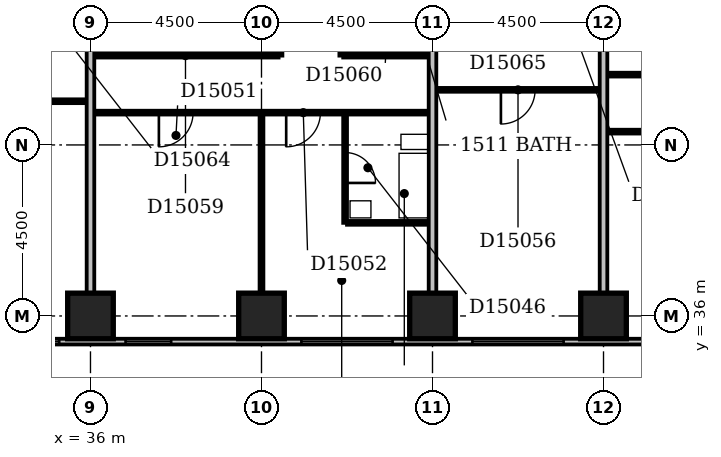
"""IFC4 building model, lengths in metres.
Left out: names, types, materials, properties, quantities, classifications, styles, units other than length and angle.
Written with IfcOpenShell. Run it as: python <this file> out.ifc"""

import sys

from ifc_helpers import new_model, si_unit, direction, frame, frame_2d, origin, origin_2d, place, context, subcontext, project, spatial, rectangle, extrude, element, fill, save


model = new_model("IFC4")
c1 = context("Model", 3, precision=1e-05, world=origin(), true_north=direction((0.0, 1.0)))
c2 = subcontext(c1, "Body", "Model", "MODEL_VIEW")
j1 = project(units=[si_unit("LENGTHUNIT", "METRE"), si_unit("PLANEANGLEUNIT", "RADIAN")], contexts=[c1])
p1 = place(None, origin())
s1 = spatial("IfcSite", under=j1, at=p1, CompositionType="ELEMENT")
p2 = place(p1, origin())
s2 = spatial("IfcBuilding", under=s1, at=p2, CompositionType="ELEMENT")
p3 = place(p2, frame((0.0, 0.0, 65.0)))
s3 = spatial("IfcBuildingStorey", under=s2, at=p3, CompositionType="ELEMENT", Elevation=65.0)
for number, where, z_axis, x_axis in (
    (1, (36.0, 36.0, -0.3), (0.0, 0.0, 1.0), (1.0, 0.0, 0.0)),
    (2, (40.5, 36.0, -0.3), (0.0, 0.0, 1.0), (1.0, 0.0, 0.0)),
    (3, (45.0, 36.0, -0.3), (0.0, 0.0, 1.0), (1.0, 0.0, 0.0)),
    (4, (49.5, 36.0, -0.3), (0.0, 0.0, 1.0), (1.0, 0.0, 0.0)),
):
    element("IfcColumn", number, at=place(p3, frame(where, z_axis=z_axis, x_axis=x_axis)), inside=s3, PredefinedType="COLUMN", context=c2, shape_type="SweptSolid", body=[
        extrude(rectangle(XDim=1.2, YDim=1.2, at=origin_2d()), origin(), (0.0, 0.0, 1.0), 3.6),
    ])
p4 = place(p3, frame((23.1, 35.325, 0.0), z_axis=(0.0, 0.0, 1.0), x_axis=(1.0, 0.0, 0.0)))
e5 = element("IfcWall", 5, at=p4, inside=s3, PredefinedType="STANDARD", context=c2, shape_type="SweptSolid", body=[
    extrude(rectangle(XDim=45.15, YDim=0.15, at=frame_2d((22.575, 0.0))), origin(), (0.0, 0.0, 1.0), 2.7),
])
p5 = place(p4, frame((0.45, 0.0, 0.6)))
e6 = element("IfcOpeningElement", 6, at=p5, cuts=e5, PredefinedType="OPENING", context=c2, shape_type="SweptSolid", body=[
    extrude(rectangle(XDim=2.4, YDim=1.8, at=frame_2d((1.2, 0.9))), frame((0.0, 0.087, 0.0), z_axis=(0.0, -1.0, 0.0), x_axis=(1.0, 0.0, 0.0)), (0.0, 0.0, 1.0), 0.174),
])
p6 = place(p4, frame((4.95, 0.0, 0.6)))
e7 = element("IfcOpeningElement", 7, at=p6, cuts=e5, PredefinedType="OPENING", context=c2, shape_type="SweptSolid", body=[
    extrude(rectangle(XDim=2.4, YDim=1.8, at=frame_2d((1.2, 0.9))), frame((0.0, 0.087, 0.0), z_axis=(0.0, -1.0, 0.0), x_axis=(1.0, 0.0, 0.0)), (0.0, 0.0, 1.0), 0.174),
])
p7 = place(p4, frame((10.877, 0.0, 0.6)))
e8 = element("IfcOpeningElement", 8, at=p7, cuts=e5, PredefinedType="OPENING", context=c2, shape_type="SweptSolid", body=[
    extrude(rectangle(XDim=1.2, YDim=1.8, at=frame_2d((0.6, 0.9))), frame((0.0, 0.087, 0.0), z_axis=(0.0, -1.0, 0.0), x_axis=(1.0, 0.0, 0.0)), (0.0, 0.0, 1.0), 0.174),
])
p8 = place(p4, frame((13.823, 0.0, 0.6)))
e9 = element("IfcOpeningElement", 9, at=p8, cuts=e5, PredefinedType="OPENING", context=c2, shape_type="SweptSolid", body=[
    extrude(rectangle(XDim=1.2, YDim=1.8, at=frame_2d((0.6, 0.9))), frame((0.0, 0.087, 0.0), z_axis=(0.0, -1.0, 0.0), x_axis=(1.0, 0.0, 0.0)), (0.0, 0.0, 1.0), 0.174),
])
p9 = place(p4, frame((18.45, 0.0, 0.6)))
e10 = element("IfcOpeningElement", 10, at=p9, cuts=e5, PredefinedType="OPENING", context=c2, shape_type="SweptSolid", body=[
    extrude(rectangle(XDim=2.4, YDim=1.8, at=frame_2d((1.2, 0.9))), frame((0.0, 0.087, 0.0), z_axis=(0.0, -1.0, 0.0), x_axis=(1.0, 0.0, 0.0)), (0.0, 0.0, 1.0), 0.174),
])
p10 = place(p4, frame((22.95, 0.0, 0.6)))
e11 = element("IfcOpeningElement", 11, at=p10, cuts=e5, PredefinedType="OPENING", context=c2, shape_type="SweptSolid", body=[
    extrude(rectangle(XDim=2.4, YDim=1.8, at=frame_2d((1.2, 0.9))), frame((0.0, 0.087, 0.0), z_axis=(0.0, -1.0, 0.0), x_axis=(1.0, 0.0, 0.0)), (0.0, 0.0, 1.0), 0.174),
])
p11 = place(p4, frame((27.45, 0.0, 0.6)))
e12 = element("IfcOpeningElement", 12, at=p11, cuts=e5, PredefinedType="OPENING", context=c2, shape_type="SweptSolid", body=[
    extrude(rectangle(XDim=2.4, YDim=1.8, at=frame_2d((1.2, 0.9))), frame((0.0, 0.087, 0.0), z_axis=(0.0, -1.0, 0.0), x_axis=(1.0, 0.0, 0.0)), (0.0, 0.0, 1.0), 0.174),
])
p12 = place(p4, frame((31.95, 0.0, 0.6)))
e13 = element("IfcOpeningElement", 13, at=p12, cuts=e5, PredefinedType="OPENING", context=c2, shape_type="SweptSolid", body=[
    extrude(rectangle(XDim=2.4, YDim=1.8, at=frame_2d((1.2, 0.9))), frame((0.0, 0.087, 0.0), z_axis=(0.0, -1.0, 0.0), x_axis=(1.0, 0.0, 0.0)), (0.0, 0.0, 1.0), 0.174),
])
p13 = place(p4, frame((36.45, 0.0, 0.6)))
e14 = element("IfcOpeningElement", 14, at=p13, cuts=e5, PredefinedType="OPENING", context=c2, shape_type="SweptSolid", body=[
    extrude(rectangle(XDim=2.4, YDim=1.8, at=frame_2d((1.2, 0.9))), frame((0.0, 0.087, 0.0), z_axis=(0.0, -1.0, 0.0), x_axis=(1.0, 0.0, 0.0)), (0.0, 0.0, 1.0), 0.174),
])
p14 = place(p4, frame((41.403, 0.0, 0.6)))
e15 = element("IfcOpeningElement", 15, at=p14, cuts=e5, PredefinedType="OPENING", context=c2, shape_type="SweptSolid", body=[
    extrude(rectangle(XDim=2.1, YDim=1.8, at=frame_2d((1.05, 0.9))), frame((0.0, 0.087, 0.0), z_axis=(0.0, -1.0, 0.0), x_axis=(1.0, 0.0, 0.0)), (0.0, 0.0, 1.0), 0.174),
])
p15 = place(p3, frame((36.0, 36.6, 0.0), z_axis=(0.0, 0.0, 1.0), x_axis=(0.0, 1.0, 0.0)))
e16 = element("IfcWall", 16, at=p15, inside=s3, PredefinedType="PARTITIONING", context=c2, shape_type="SweptSolid", body=[
    extrude(rectangle(XDim=12.8, YDim=0.2, at=frame_2d((6.4, 0.0))), origin(), (0.0, 0.0, 1.0), 2.4),
])
p16 = place(p3, frame((40.5, 36.6, 0.0), z_axis=(0.0, 0.0, 1.0), x_axis=(0.0, 1.0, 0.0)))
e17 = element("IfcWall", 17, at=p16, inside=s3, PredefinedType="PARTITIONING", context=c2, shape_type="SweptSolid", body=[
    extrude(rectangle(XDim=4.7, YDim=0.1, at=frame_2d((2.35, 0.0))), origin(), (0.0, 0.0, 1.0), 3.3),
])
p17 = place(p3, frame((45.0, 36.6, 0.0), z_axis=(0.0, 0.0, 1.0), x_axis=(0.0, 1.0, 0.0)))
e18 = element("IfcWall", 18, at=p17, inside=s3, PredefinedType="PARTITIONING", context=c2, shape_type="SweptSolid", body=[
    extrude(rectangle(XDim=12.8, YDim=0.2, at=frame_2d((6.4, 0.0))), origin(), (0.0, 0.0, 1.0), 2.6),
])
p18 = place(p3, frame((49.5, 36.6, 0.0), z_axis=(0.0, 0.0, 1.0), x_axis=(0.0, 1.0, 0.0)))
e19 = element("IfcWall", 19, at=p18, inside=s3, PredefinedType="PARTITIONING", context=c2, shape_type="SweptSolid", body=[
    extrude(rectangle(XDim=12.8, YDim=0.2, at=frame_2d((6.4, 0.0))), origin(), (0.0, 0.0, 1.0), 3.3),
])
p19 = place(p3, frame((42.7, 38.45, 0.0), z_axis=(0.0, 0.0, 1.0), x_axis=(0.0, 1.0, 0.0)))
e20 = element("IfcWall", 20, at=p19, inside=s3, PredefinedType="PLUMBINGWALL", context=c2, shape_type="SweptSolid", body=[
    extrude(rectangle(XDim=2.85, YDim=0.1, at=frame_2d((1.425, 0.0))), origin(), (0.0, 0.0, 1.0), 3.3),
])
p20 = place(p19, frame((1.05, 0.0, 0.0)))
e21 = element("IfcOpeningElement", 21, at=p20, cuts=e20, PredefinedType="OPENING", context=c2, shape_type="SweptSolid", body=[
    extrude(rectangle(XDim=0.8, YDim=2.1, at=frame_2d((0.4, 1.05))), frame((0.0, 0.062, 0.0), z_axis=(0.0, -1.0, 0.0), x_axis=(1.0, 0.0, 0.0)), (0.0, 0.0, 1.0), 0.124),
])
p21 = place(p3, frame((42.75, 38.45, 0.0), z_axis=(0.0, 0.0, 1.0), x_axis=(1.0, 0.0, 0.0)))
e22 = element("IfcWall", 22, at=p21, inside=s3, PredefinedType="PLUMBINGWALL", context=c2, shape_type="SweptSolid", body=[
    extrude(rectangle(XDim=2.15, YDim=0.1, at=frame_2d((1.075, 0.0))), origin(), (0.0, 0.0, 1.0), 3.3),
])
p22 = place(p3, frame((49.6, 40.85, 0.0), z_axis=(0.0, 0.0, 1.0), x_axis=(1.0, 0.0, 0.0)))
e23 = element("IfcWall", 23, at=p22, inside=s3, PredefinedType="PARTITIONING", context=c2, shape_type="SweptSolid", body=[
    extrude(rectangle(XDim=8.8, YDim=0.1, at=frame_2d((4.4, 0.0))), origin(), (0.0, 0.0, 1.0), 3.3),
])
p23 = place(p22, frame((1.7, 0.0, 0.0)))
e24 = element("IfcOpeningElement", 24, at=p23, cuts=e23, PredefinedType="OPENING", context=c2, shape_type="SweptSolid", body=[
    extrude(rectangle(XDim=0.9, YDim=2.1, at=frame_2d((0.45, 1.05))), frame((0.0, 0.062, 0.0), z_axis=(0.0, -1.0, 0.0), x_axis=(1.0, 0.0, 0.0)), (0.0, 0.0, 1.0), 0.124),
])
p24 = place(p22, frame((5.05, 0.0, 0.0)))
e25 = element("IfcOpeningElement", 25, at=p24, cuts=e23, PredefinedType="OPENING", context=c2, shape_type="SweptSolid", body=[
    extrude(rectangle(XDim=0.9, YDim=2.1, at=frame_2d((0.45, 1.05))), frame((0.0, 0.062, 0.0), z_axis=(0.0, -1.0, 0.0), x_axis=(1.0, 0.0, 0.0)), (0.0, 0.0, 1.0), 0.124),
])
p25 = place(p3, frame((36.1, 41.35, 0.0), z_axis=(0.0, 0.0, 1.0), x_axis=(1.0, 0.0, 0.0)))
e26 = element("IfcWall", 26, at=p25, inside=s3, PredefinedType="PARTITIONING", context=c2, shape_type="SweptSolid", body=[
    extrude(rectangle(XDim=8.8, YDim=0.1, at=frame_2d((4.4, 0.0))), origin(), (0.0, 0.0, 1.0), 3.3),
])
p26 = place(p25, frame((1.7, 0.0, 0.0)))
e27 = element("IfcOpeningElement", 27, at=p26, cuts=e26, PredefinedType="OPENING", context=c2, shape_type="SweptSolid", body=[
    extrude(rectangle(XDim=0.9, YDim=2.1, at=frame_2d((0.45, 1.05))), frame((0.0, 0.062, 0.0), z_axis=(0.0, -1.0, 0.0), x_axis=(1.0, 0.0, 0.0)), (0.0, 0.0, 1.0), 0.124),
])
p27 = place(p25, frame((5.05, 0.0, 0.0)))
e28 = element("IfcOpeningElement", 28, at=p27, cuts=e26, PredefinedType="OPENING", context=c2, shape_type="SweptSolid", body=[
    extrude(rectangle(XDim=0.9, YDim=2.1, at=frame_2d((0.45, 1.05))), frame((0.0, 0.062, 0.0), z_axis=(0.0, -1.0, 0.0), x_axis=(1.0, 0.0, 0.0)), (0.0, 0.0, 1.0), 0.124),
])
p28 = place(p3, frame((22.6, 41.65, 0.0), z_axis=(0.0, 0.0, 1.0), x_axis=(1.0, 0.0, 0.0)))
e29 = element("IfcWall", 29, at=p28, inside=s3, PredefinedType="PARTITIONING", context=c2, shape_type="SweptSolid", body=[
    extrude(rectangle(XDim=13.3, YDim=0.1, at=frame_2d((6.65, 0.0))), origin(), (0.0, 0.0, 1.0), 3.3),
])
p29 = place(p28, frame((1.7, 0.0, 0.0)))
e30 = element("IfcOpeningElement", 30, at=p29, cuts=e29, PredefinedType="OPENING", context=c2, shape_type="SweptSolid", body=[
    extrude(rectangle(XDim=0.9, YDim=2.1, at=frame_2d((0.45, 1.05))), frame((0.0, 0.062, 0.0), z_axis=(0.0, -1.0, 0.0), x_axis=(1.0, 0.0, 0.0)), (0.0, 0.0, 1.0), 0.124),
])
p30 = place(p28, frame((6.2, 0.0, 0.0)))
e31 = element("IfcOpeningElement", 31, at=p30, cuts=e29, PredefinedType="OPENING", context=c2, shape_type="SweptSolid", body=[
    extrude(rectangle(XDim=0.9, YDim=2.1, at=frame_2d((0.45, 1.05))), frame((0.0, 0.062, 0.0), z_axis=(0.0, -1.0, 0.0), x_axis=(1.0, 0.0, 0.0)), (0.0, 0.0, 1.0), 0.124),
])
p31 = place(p28, frame((10.7, 0.0, 0.0)))
e32 = element("IfcOpeningElement", 32, at=p31, cuts=e29, PredefinedType="OPENING", context=c2, shape_type="SweptSolid", body=[
    extrude(rectangle(XDim=0.9, YDim=2.1, at=frame_2d((0.45, 1.05))), frame((0.0, 0.062, 0.0), z_axis=(0.0, -1.0, 0.0), x_axis=(1.0, 0.0, 0.0)), (0.0, 0.0, 1.0), 0.124),
])
p32 = place(p3, frame((45.1, 41.95, 0.0), z_axis=(0.0, 0.0, 1.0), x_axis=(1.0, 0.0, 0.0)))
e33 = element("IfcWall", 33, at=p32, inside=s3, PredefinedType="PARTITIONING", context=c2, shape_type="SweptSolid", body=[
    extrude(rectangle(XDim=4.3, YDim=0.1, at=frame_2d((2.15, 0.0))), origin(), (0.0, 0.0, 1.0), 3.3),
])
p33 = place(p32, frame((1.7, 0.0, 0.0)))
e34 = element("IfcOpeningElement", 34, at=p33, cuts=e33, PredefinedType="OPENING", context=c2, shape_type="SweptSolid", body=[
    extrude(rectangle(XDim=0.9, YDim=2.1, at=frame_2d((0.45, 1.05))), frame((0.0, 0.062, 0.0), z_axis=(0.0, -1.0, 0.0), x_axis=(1.0, 0.0, 0.0)), (0.0, 0.0, 1.0), 0.124),
])
p34 = place(p3, frame((49.6, 42.35, 0.0), z_axis=(0.0, 0.0, 1.0), x_axis=(1.0, 0.0, 0.0)))
e35 = element("IfcWall", 35, at=p34, inside=s3, PredefinedType="PARTITIONING", context=c2, shape_type="SweptSolid", body=[
    extrude(rectangle(XDim=4.85, YDim=0.1, at=frame_2d((2.425, 0.0))), origin(), (0.0, 0.0, 1.0), 3.3),
])
p35 = place(p34, frame((1.95, 0.0, 0.0)))
e36 = element("IfcOpeningElement", 36, at=p35, cuts=e35, PredefinedType="OPENING", context=c2, shape_type="SweptSolid", body=[
    extrude(rectangle(XDim=0.9, YDim=2.1, at=frame_2d((0.45, 1.05))), frame((0.0, 0.062, 0.0), z_axis=(0.0, -1.0, 0.0), x_axis=(1.0, 0.0, 0.0)), (0.0, 0.0, 1.0), 0.124),
])
p36 = place(p3, frame((36.1, 42.85, 0.0), z_axis=(0.0, 0.0, 1.0), x_axis=(1.0, 0.0, 0.0)))
e37 = element("IfcWall", 37, at=p36, inside=s3, PredefinedType="PARTITIONING", context=c2, shape_type="SweptSolid", body=[
    extrude(rectangle(XDim=4.85, YDim=0.1, at=frame_2d((2.425, 0.0))), origin(), (0.0, 0.0, 1.0), 3.3),
])
p37 = place(p36, frame((1.95, 0.0, 0.0)))
e38 = element("IfcOpeningElement", 38, at=p37, cuts=e37, PredefinedType="OPENING", context=c2, shape_type="SweptSolid", body=[
    extrude(rectangle(XDim=0.9, YDim=2.1, at=frame_2d((0.45, 1.05))), frame((0.0, 0.062, 0.0), z_axis=(0.0, -1.0, 0.0), x_axis=(1.0, 0.0, 0.0)), (0.0, 0.0, 1.0), 0.124),
])
p38 = place(p3, frame((41.0, 42.85, 0.0), z_axis=(0.0, 0.0, 1.0), x_axis=(0.0, 1.0, 0.0)))
e39 = element("IfcWall", 39, at=p38, inside=s3, PredefinedType="PARTITIONING", context=c2, shape_type="SweptSolid", body=[
    extrude(rectangle(XDim=6.55, YDim=0.1, at=frame_2d((3.275, 0.0))), origin(), (0.0, 0.0, 1.0), 3.3),
])
p39 = place(p3, frame((42.6, 42.85, 0.0), z_axis=(0.0, 0.0, 1.0), x_axis=(0.0, 1.0, 0.0)))
e40 = element("IfcWall", 40, at=p39, inside=s3, PredefinedType="PLUMBINGWALL", context=c2, shape_type="SweptSolid", body=[
    extrude(rectangle(XDim=6.55, YDim=0.1, at=frame_2d((3.275, 0.0))), origin(), (0.0, 0.0, 1.0), 3.3),
])
p40 = place(p3, frame((42.65, 42.85, 0.0), z_axis=(0.0, 0.0, 1.0), x_axis=(1.0, 0.0, 0.0)))
e41 = element("IfcWall", 41, at=p40, inside=s3, PredefinedType="PARTITIONING", context=c2, shape_type="SweptSolid", body=[
    extrude(rectangle(XDim=2.25, YDim=0.1, at=frame_2d((1.125, 0.0))), origin(), (0.0, 0.0, 1.0), 3.3),
])
p41 = place(p40, frame((0.75, 0.0, 0.0)))
e42 = element("IfcOpeningElement", 42, at=p41, cuts=e41, PredefinedType="OPENING", context=c2, shape_type="SweptSolid", body=[
    extrude(rectangle(XDim=0.8, YDim=2.1, at=frame_2d((0.4, 1.05))), frame((0.0, 0.062, 0.0), z_axis=(0.0, -1.0, 0.0), x_axis=(1.0, 0.0, 0.0)), (0.0, 0.0, 1.0), 0.124),
])
p42 = place(p7, origin())
e43 = element("IfcWindow", 43, at=p42, inside=s3, PartitioningType="SINGLE_PANEL", PredefinedType="WINDOW", context=c2, shape_type="SweptSolid", body=[
    extrude(rectangle(XDim=1.2, YDim=1.8, at=frame_2d((0.6, 0.9))), frame((0.0, 0.03, 0.0), z_axis=(0.0, -1.0, 0.0), x_axis=(1.0, 0.0, 0.0)), (0.0, 0.0, 1.0), 0.06),
])
fill(e8, e43)
p43 = place(p8, origin())
e44 = element("IfcWindow", 44, at=p43, inside=s3, PartitioningType="SINGLE_PANEL", PredefinedType="WINDOW", context=c2, shape_type="SweptSolid", body=[
    extrude(rectangle(XDim=1.2, YDim=1.8, at=frame_2d((0.6, 0.9))), frame((0.0, 0.03, 0.0), z_axis=(0.0, -1.0, 0.0), x_axis=(1.0, 0.0, 0.0)), (0.0, 0.0, 1.0), 0.06),
])
fill(e9, e44)
p44 = place(p9, origin())
e45 = element("IfcWindow", 45, at=p44, inside=s3, PartitioningType="SINGLE_PANEL", PredefinedType="WINDOW", context=c2, shape_type="SweptSolid", body=[
    extrude(rectangle(XDim=2.4, YDim=1.8, at=frame_2d((1.2, 0.9))), frame((0.0, 0.03, 0.0), z_axis=(0.0, -1.0, 0.0), x_axis=(1.0, 0.0, 0.0)), (0.0, 0.0, 1.0), 0.06),
])
fill(e10, e45)
p45 = place(p10, origin())
e46 = element("IfcWindow", 46, at=p45, inside=s3, PartitioningType="SINGLE_PANEL", PredefinedType="WINDOW", context=c2, shape_type="SweptSolid", body=[
    extrude(rectangle(XDim=2.4, YDim=1.8, at=frame_2d((1.2, 0.9))), frame((0.0, 0.03, 0.0), z_axis=(0.0, -1.0, 0.0), x_axis=(1.0, 0.0, 0.0)), (0.0, 0.0, 1.0), 0.06),
])
fill(e11, e46)
p46 = place(p20, frame((0.8, 0.0, 0.0), z_axis=(0.0, 0.0, 1.0), x_axis=(-1.0, 0.0, 0.0)))
e47 = element("IfcDoor", 47, at=p46, inside=s3, OperationType="SINGLE_SWING_RIGHT", PredefinedType="DOOR", context=c2, shape_type="SweptSolid", body=[
    extrude(rectangle(XDim=0.8, YDim=2.1, at=frame_2d((0.4, 1.05))), frame((0.0, 0.025, 0.0), z_axis=(0.0, -1.0, 0.0), x_axis=(1.0, 0.0, 0.0)), (0.0, 0.0, 1.0), 0.05),
])
fill(e21, e47)
p47 = place(p26, frame((0.9, 0.0, 0.0), z_axis=(0.0, 0.0, 1.0), x_axis=(-1.0, 0.0, 0.0)))
e48 = element("IfcDoor", 48, at=p47, inside=s3, OperationType="SINGLE_SWING_RIGHT", PredefinedType="DOOR", context=c2, shape_type="SweptSolid", body=[
    extrude(rectangle(XDim=0.9, YDim=2.1, at=frame_2d((0.45, 1.05))), frame((0.0, 0.025, 0.0), z_axis=(0.0, -1.0, 0.0), x_axis=(1.0, 0.0, 0.0)), (0.0, 0.0, 1.0), 0.05),
])
fill(e27, e48)
p48 = place(p27, frame((0.9, 0.0, 0.0), z_axis=(0.0, 0.0, 1.0), x_axis=(-1.0, 0.0, 0.0)))
e49 = element("IfcDoor", 49, at=p48, inside=s3, OperationType="SINGLE_SWING_RIGHT", PredefinedType="DOOR", context=c2, shape_type="SweptSolid", body=[
    extrude(rectangle(XDim=0.9, YDim=2.1, at=frame_2d((0.45, 1.05))), frame((0.0, 0.025, 0.0), z_axis=(0.0, -1.0, 0.0), x_axis=(1.0, 0.0, 0.0)), (0.0, 0.0, 1.0), 0.05),
])
fill(e28, e49)
p49 = place(p33, frame((0.9, 0.0, 0.0), z_axis=(0.0, 0.0, 1.0), x_axis=(-1.0, 0.0, 0.0)))
e50 = element("IfcDoor", 50, at=p49, inside=s3, OperationType="SINGLE_SWING_RIGHT", PredefinedType="DOOR", context=c2, shape_type="SweptSolid", body=[
    extrude(rectangle(XDim=0.9, YDim=2.1, at=frame_2d((0.45, 1.05))), frame((0.0, 0.025, 0.0), z_axis=(0.0, -1.0, 0.0), x_axis=(1.0, 0.0, 0.0)), (0.0, 0.0, 1.0), 0.05),
])
fill(e34, e50)
p50 = place(p37, origin())
e51 = element("IfcDoor", 51, at=p50, inside=s3, OperationType="SINGLE_SWING_LEFT", PredefinedType="DOOR", context=c2, shape_type="SweptSolid", body=[
    extrude(rectangle(XDim=0.9, YDim=2.1, at=frame_2d((0.45, 1.05))), frame((0.0, 0.025, 0.0), z_axis=(0.0, -1.0, 0.0), x_axis=(1.0, 0.0, 0.0)), (0.0, 0.0, 1.0), 0.05),
])
fill(e38, e51)
p51 = place(p41, origin())
e52 = element("IfcDoor", 52, at=p51, inside=s3, OperationType="SINGLE_SWING_LEFT", PredefinedType="DOOR", context=c2, shape_type="SweptSolid", body=[
    extrude(rectangle(XDim=0.8, YDim=2.1, at=frame_2d((0.4, 1.05))), frame((0.0, 0.025, 0.0), z_axis=(0.0, -1.0, 0.0), x_axis=(1.0, 0.0, 0.0)), (0.0, 0.0, 1.0), 0.05),
])
fill(e42, e52)
save(model, sys.argv[1])
